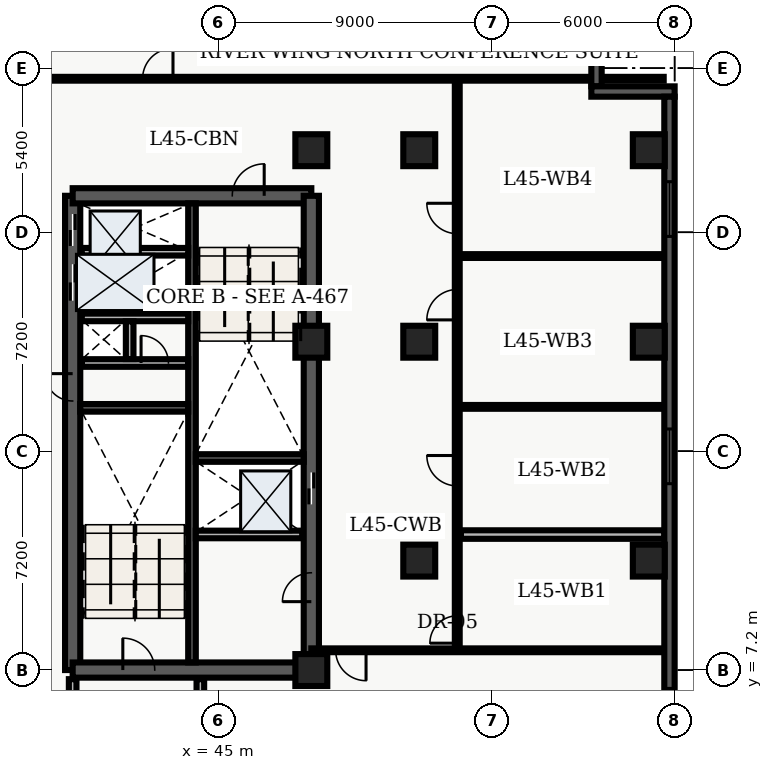
"""IFC4 building model, lengths in metres.
Left out: names, types, materials, properties, quantities, classifications, styles, units other than length and angle.
Written with IfcOpenShell. Run it as: python <this file> out.ifc"""

import sys

from ifc_helpers import new_model, entity, si_unit, converted_unit, direction, frame, origin_with_axes, origin_2d_with_axis, place, context, subcontext, project, spatial, polyline, rectangle, outline, extrude, element, fill, save


model = new_model("IFC4")
c1 = context("Model", 3, precision=1e-05, world=origin_with_axes(), true_north=direction((0.0, 1.0)))
c2 = subcontext(c1, "Body", "Model", "MODEL_VIEW")
j1 = project(units=[si_unit("LENGTHUNIT", "METRE"), converted_unit("PLANEANGLEUNIT", "DEGREE", entity("IfcPlaneAngleMeasure", 0.017), si_unit("PLANEANGLEUNIT", "RADIAN"), dimensions=[0, 0, 0, 0, 0, 0, 0])], contexts=[c1])
p1 = place(None, origin_with_axes())
s1 = spatial("IfcSite", under=j1, at=p1, CompositionType="ELEMENT")
p2 = place(p1, origin_with_axes())
s2 = spatial("IfcBuilding", under=s1, at=p2, CompositionType="ELEMENT")
p3 = place(p2, frame((0.0, 0.0, 183.6), z_axis=(0.0, 0.0, 1.0), x_axis=(1.0, 0.0, 0.0)))
s3 = spatial("IfcBuildingStorey", under=s2, at=p3, CompositionType="ELEMENT", Elevation=183.6)
p4 = place(p3, frame((40.2, 7.2, 0.0), z_axis=(0.0, 0.0, 1.0), x_axis=(0.0, 1.0, 0.0)))
e1 = element("IfcWall", 1, at=p4, inside=s3, PredefinedType="SHEAR", context=c2, shape_type="SweptSolid", body=[
    extrude(outline(polyline([(0.0, -0.25), (15.6, -0.25), (15.6, 0.25), (0.0, 0.25), (0.0, -0.25)])), origin_with_axes(), (0.0, 0.0, 1.0), 3.6),
])
p5 = place(p4, frame((14.475, 0.0, 0.0), z_axis=(0.0, 0.0, 1.0), x_axis=(1.0, 0.0, 0.0)))
e2 = element("IfcOpeningElement", 2, at=p5, cuts=e1, PredefinedType="OPENING", context=c2, shape_type="SweptSolid", body=[
    extrude(rectangle(XDim=1.05, YDim=0.52, at=origin_2d_with_axis()), origin_with_axes(), (0.0, 0.0, 1.0), 2.15),
])
p6 = place(p4, frame((12.75, 0.0, 0.0), z_axis=(0.0, 0.0, 1.0), x_axis=(1.0, 0.0, 0.0)))
e3 = element("IfcOpeningElement", 3, at=p6, cuts=e1, PredefinedType="OPENING", context=c2, shape_type="SweptSolid", body=[
    extrude(rectangle(XDim=1.2, YDim=0.52, at=origin_2d_with_axis()), origin_with_axes(), (0.0, 0.0, 1.0), 2.15),
])
p7 = place(p4, frame((9.3, 0.0, 0.0), z_axis=(0.0, 0.0, 1.0), x_axis=(1.0, 0.0, 0.0)))
e4 = element("IfcOpeningElement", 4, at=p7, cuts=e1, PredefinedType="OPENING", context=c2, shape_type="SweptSolid", body=[
    extrude(rectangle(XDim=0.9, YDim=0.52, at=origin_2d_with_axis()), origin_with_axes(), (0.0, 0.0, 1.0), 2.15),
])
p8 = place(p3, frame((40.2, 7.2, 0.0), z_axis=(0.0, 0.0, 1.0), x_axis=(1.0, 0.0, 0.0)))
e5 = element("IfcWall", 5, at=p8, inside=s3, PredefinedType="SHEAR", context=c2, shape_type="SweptSolid", body=[
    extrude(outline(polyline([(0.0, -0.25), (7.85, -0.25), (7.85, 0.25), (0.0, 0.25), (0.0, -0.25)])), origin_with_axes(), (0.0, 0.0, 1.0), 3.6),
])
p9 = place(p8, frame((2.175, 0.0, 0.0), z_axis=(0.0, 0.0, 1.0), x_axis=(1.0, 0.0, 0.0)))
e6 = element("IfcOpeningElement", 6, at=p9, cuts=e5, PredefinedType="OPENING", context=c2, shape_type="SweptSolid", body=[
    extrude(rectangle(XDim=1.05, YDim=0.52, at=origin_2d_with_axis()), origin_with_axes(), (0.0, 0.0, 1.0), 2.15),
])
p10 = place(p3, frame((40.2, 22.8, 0.0), z_axis=(0.0, 0.0, 1.0), x_axis=(1.0, 0.0, 0.0)))
e7 = element("IfcWall", 7, at=p10, inside=s3, PredefinedType="SHEAR", context=c2, shape_type="SweptSolid", body=[
    extrude(outline(polyline([(0.0, -0.25), (7.85, -0.25), (7.85, 0.25), (0.0, 0.25), (0.0, -0.25)])), origin_with_axes(), (0.0, 0.0, 1.0), 3.6),
])
p11 = place(p10, frame((5.775, 0.0, 0.0), z_axis=(0.0, 0.0, 1.0), x_axis=(1.0, 0.0, 0.0)))
e8 = element("IfcOpeningElement", 8, at=p11, cuts=e7, PredefinedType="OPENING", context=c2, shape_type="SweptSolid", body=[
    extrude(rectangle(XDim=1.05, YDim=0.52, at=origin_2d_with_axis()), origin_with_axes(), (0.0, 0.0, 1.0), 2.15),
])
p12 = place(p3, frame((48.05, 7.2, 0.0), z_axis=(0.0, 0.0, 1.0), x_axis=(0.0, 1.0, 0.0)))
e9 = element("IfcWall", 9, at=p12, inside=s3, PredefinedType="SHEAR", context=c2, shape_type="SweptSolid", body=[
    extrude(outline(polyline([(0.0, -0.25), (15.6, -0.25), (15.6, 0.25), (0.0, 0.25), (0.0, -0.25)])), origin_with_axes(), (0.0, 0.0, 1.0), 3.6),
])
p13 = place(p12, frame((5.975, 0.0, 0.0), z_axis=(0.0, 0.0, 1.0), x_axis=(1.0, 0.0, 0.0)))
e10 = element("IfcOpeningElement", 10, at=p13, cuts=e9, PredefinedType="OPENING", context=c2, shape_type="SweptSolid", body=[
    extrude(rectangle(XDim=1.05, YDim=0.52, at=origin_2d_with_axis()), origin_with_axes(), (0.0, 0.0, 1.0), 2.15),
])
p14 = place(p12, frame((2.725, 0.0, 0.0), z_axis=(0.0, 0.0, 1.0), x_axis=(1.0, 0.0, 0.0)))
e11 = element("IfcOpeningElement", 11, at=p14, cuts=e9, PredefinedType="OPENING", context=c2, shape_type="SweptSolid", body=[
    extrude(rectangle(XDim=0.95, YDim=0.52, at=origin_2d_with_axis()), origin_with_axes(), (0.0, 0.0, 1.0), 2.15),
])
p15 = place(p3, frame((44.125, 7.45, 0.0), z_axis=(0.0, 0.0, 1.0), x_axis=(0.0, 1.0, 0.0)))
e12 = element("IfcWall", 12, at=p15, inside=s3, PredefinedType="SHEAR", context=c2, shape_type="SweptSolid", body=[
    extrude(outline(polyline([(0.0, -0.125), (15.1, -0.125), (15.1, 0.125), (0.0, 0.125), (0.0, -0.125)])), origin_with_axes(), (0.0, 0.0, 1.0), 3.6),
])
for number, where, z_axis, x_axis in (
    (13, (40.45, 15.825, 0.0), (0.0, 0.0, 1.0), (1.0, 0.0, 0.0)),
    (14, (44.25, 14.175, 0.0), (0.0, 0.0, 1.0), (1.0, 0.0, 0.0)),
):
    element("IfcWall", number, at=place(p3, frame(where, z_axis=z_axis, x_axis=x_axis)), inside=s3, PredefinedType="SHEAR", context=c2, shape_type="SweptSolid", body=[
        extrude(outline(polyline([(0.0, -0.125), (3.55, -0.125), (3.55, 0.125), (0.0, 0.125), (0.0, -0.125)])), origin_with_axes(), (0.0, 0.0, 1.0), 3.6),
    ])
p16 = place(p3, frame((40.5, 17.3, 0.0), z_axis=(0.0, 0.0, 1.0), x_axis=(1.0, 0.0, 0.0)))
e15 = element("IfcWall", 15, at=p16, inside=s3, PredefinedType="SOLIDWALL", context=c2, shape_type="SweptSolid", body=[
    extrude(outline(polyline([(0.0, -0.125), (3.5, -0.125), (3.5, 0.125), (0.0, 0.125), (0.0, -0.125)])), origin_with_axes(), (0.0, 0.0, 1.0), 2.64),
])
p17 = place(p16, frame((2.4, 0.0, 0.0), z_axis=(0.0, 0.0, 1.0), x_axis=(1.0, 0.0, 0.0)))
e16 = element("IfcOpeningElement", 16, at=p17, cuts=e15, PredefinedType="OPENING", context=c2, shape_type="SweptSolid", body=[
    extrude(rectangle(XDim=0.9, YDim=0.27, at=origin_2d_with_axis()), origin_with_axes(), (0.0, 0.0, 1.0), 2.15),
])
p18 = place(p3, frame((40.5, 18.8, 0.0), z_axis=(0.0, 0.0, 1.0), x_axis=(1.0, 0.0, 0.0)))
e17 = element("IfcWall", 17, at=p18, inside=s3, PredefinedType="SOLIDWALL", context=c2, shape_type="SweptSolid", body=[
    extrude(outline(polyline([(0.0, -0.125), (3.5, -0.125), (3.5, 0.125), (0.0, 0.125), (0.0, -0.125)])), origin_with_axes(), (0.0, 0.0, 1.0), 2.64),
])
p19 = place(p3, frame((42.075, 17.43, 0.0), z_axis=(0.0, 0.0, 1.0), x_axis=(0.0, 1.0, 0.0)))
e18 = element("IfcWall", 18, at=p19, inside=s3, PredefinedType="SOLIDWALL", context=c2, shape_type="SweptSolid", body=[
    extrude(outline(polyline([(0.0, -0.125), (1.24, -0.125), (1.24, 0.125), (0.0, 0.125), (0.0, -0.125)])), origin_with_axes(), (0.0, 0.0, 1.0), 2.64),
])
p20 = place(p3, frame((40.2, 3.1, 0.0), z_axis=(0.0, 0.0, 1.0), x_axis=(0.0, 1.0, 0.0)))
e19 = element("IfcWall", 19, at=p20, inside=s3, PredefinedType="SOLIDWALL", context=c2, shape_type="SweptSolid", body=[
    extrude(outline(polyline([(0.0, -0.125), (3.8, -0.125), (3.8, 0.125), (0.0, 0.125), (0.0, -0.125)])), origin_with_axes(), (0.0, 0.0, 1.0), 2.64),
])
p21 = place(p20, frame((2.075, 0.0, 0.0), z_axis=(0.0, 0.0, 1.0), x_axis=(1.0, 0.0, 0.0)))
e20 = element("IfcOpeningElement", 20, at=p21, cuts=e19, PredefinedType="OPENING", context=c2, shape_type="SweptSolid", body=[
    extrude(rectangle(XDim=1.05, YDim=0.27, at=origin_2d_with_axis()), origin_with_axes(), (0.0, 0.0, 1.0), 2.15),
])
p22 = place(p3, frame((44.4, 3.1, 0.0), z_axis=(0.0, 0.0, 1.0), x_axis=(0.0, 1.0, 0.0)))
e21 = element("IfcWall", 21, at=p22, inside=s3, PredefinedType="SOLIDWALL", context=c2, shape_type="SweptSolid", body=[
    extrude(outline(polyline([(0.0, -0.125), (3.8, -0.125), (3.8, 0.125), (0.0, 0.125), (0.0, -0.125)])), origin_with_axes(), (0.0, 0.0, 1.0), 2.64),
])
for number, where, z_axis, x_axis in (
    (22, (48.05, 7.2, 0.0), (0.0, 0.0, 1.0), (1.0, 0.0, 0.0)),
    (23, (48.05, 18.0, 0.0), (0.0, 0.0, 1.0), (1.0, 0.0, 0.0)),
    (24, (48.05, 24.3, 0.0), (0.0, 0.0, 1.0), (1.0, 0.0, 0.0)),
    (25, (51.6, 10.8, 0.0), (0.0, 0.0, 1.0), (1.0, 0.0, 0.0)),
    (26, (51.6, 18.0, 0.0), (0.0, 0.0, 1.0), (1.0, 0.0, 0.0)),
    (27, (51.6, 24.3, 0.0), (0.0, 0.0, 1.0), (1.0, 0.0, 0.0)),
    (28, (59.15, 10.8, 0.0), (0.0, 0.0, 1.0), (1.0, 0.0, 0.0)),
    (29, (59.15, 18.0, 0.0), (0.0, 0.0, 1.0), (1.0, 0.0, 0.0)),
    (30, (59.15, 24.3, 0.0), (0.0, 0.0, 1.0), (1.0, 0.0, 0.0)),
):
    element("IfcColumn", number, at=place(p3, frame(where, z_axis=z_axis, x_axis=x_axis)), inside=s3, PredefinedType="COLUMN", context=c2, shape_type="SweptSolid", body=[
        extrude(rectangle(XDim=1.05, YDim=1.05, at=origin_2d_with_axis()), origin_with_axes(), (0.0, 0.0, 1.0), 3.9),
    ])
for number, where, z_axis, x_axis in (
    (31, (40.5, 20.96, 0.0), (0.0, 0.0, 1.0), (1.0, 0.0, 0.0)),
    (32, (44.25, 11.66, 0.0), (0.0, 0.0, 1.0), (1.0, 0.0, 0.0)),
):
    element("IfcWall", number, at=place(p3, frame(where, z_axis=z_axis, x_axis=x_axis)), inside=s3, PredefinedType="SOLIDWALL", context=c2, shape_type="SweptSolid", body=[
        extrude(outline(polyline([(0.0, -0.125), (3.5, -0.125), (3.5, 0.125), (0.0, 0.125), (0.0, -0.125)])), origin_with_axes(), (0.0, 0.0, 1.0), 2.64),
    ])
p23 = place(p3, frame((52.85, 7.85, 0.0), z_axis=(0.0, 0.0, 1.0), x_axis=(0.0, 1.0, 0.0)))
e33 = element("IfcWall", 33, at=p23, inside=s3, PredefinedType="PARTITIONING", context=c2, shape_type="SweptSolid", body=[
    extrude(outline(polyline([(0.0, -0.08), (18.8, -0.08), (18.8, 0.08), (0.0, 0.08), (0.0, -0.08)])), origin_with_axes(), (0.0, 0.0, 1.0), 2.64),
])
p24 = place(p23, frame((0.684, 0.0, 0.0), z_axis=(0.0, 0.0, 1.0), x_axis=(1.0, 0.0, 0.0)))
e34 = element("IfcOpeningElement", 34, at=p24, cuts=e33, PredefinedType="OPENING", context=c2, shape_type="SweptSolid", body=[
    extrude(rectangle(XDim=0.9, YDim=0.18, at=origin_2d_with_axis()), origin_with_axes(), (0.0, 0.0, 1.0), 2.15),
])
p25 = place(p23, frame((5.907, 0.0, 0.0), z_axis=(0.0, 0.0, 1.0), x_axis=(1.0, 0.0, 0.0)))
e35 = element("IfcOpeningElement", 35, at=p25, cuts=e33, PredefinedType="OPENING", context=c2, shape_type="SweptSolid", body=[
    extrude(rectangle(XDim=1.0, YDim=0.18, at=origin_2d_with_axis()), origin_with_axes(), (0.0, 0.0, 1.0), 2.15),
])
p26 = place(p23, frame((11.368, 0.0, 0.0), z_axis=(0.0, 0.0, 1.0), x_axis=(1.0, 0.0, 0.0)))
e36 = element("IfcOpeningElement", 36, at=p26, cuts=e33, PredefinedType="OPENING", context=c2, shape_type="SweptSolid", body=[
    extrude(rectangle(XDim=1.0, YDim=0.18, at=origin_2d_with_axis()), origin_with_axes(), (0.0, 0.0, 1.0), 2.15),
])
p27 = place(p23, frame((14.204, 0.0, 0.0), z_axis=(0.0, 0.0, 1.0), x_axis=(1.0, 0.0, 0.0)))
e37 = element("IfcOpeningElement", 37, at=p27, cuts=e33, PredefinedType="OPENING", context=c2, shape_type="SweptSolid", body=[
    extrude(rectangle(XDim=1.0, YDim=0.18, at=origin_2d_with_axis()), origin_with_axes(), (0.0, 0.0, 1.0), 2.15),
])
p28 = place(p3, frame((59.665, 7.85, 0.0), z_axis=(0.0, 0.0, 1.0), x_axis=(-1.0, 0.0, 0.0)))
e38 = element("IfcWall", 38, at=p28, inside=s3, PredefinedType="PARTITIONING", context=c2, shape_type="SweptSolid", body=[
    extrude(outline(polyline([(0.0, -0.062), (11.615, -0.062), (11.615, 0.062), (0.0, 0.062), (0.0, -0.062)])), origin_with_axes(), (0.0, 0.0, 1.0), 2.64),
])
p29 = place(p28, frame((10.315, 0.0, 0.0), z_axis=(0.0, 0.0, 1.0), x_axis=(1.0, 0.0, 0.0)))
e39 = element("IfcOpeningElement", 39, at=p29, cuts=e38, PredefinedType="OPENING", context=c2, shape_type="SweptSolid", body=[
    extrude(rectangle(XDim=1.0, YDim=0.145, at=origin_2d_with_axis()), origin_with_axes(), (0.0, 0.0, 1.0), 2.15),
])
p30 = place(p3, frame((38.735, 26.65, 0.0), z_axis=(0.0, 0.0, 1.0), x_axis=(1.0, 0.0, 0.0)))
e40 = element("IfcWall", 40, at=p30, inside=s3, PredefinedType="PARTITIONING", context=c2, shape_type="SweptSolid", body=[
    extrude(outline(polyline([(0.0, -0.062), (20.905, -0.062), (20.905, 0.062), (0.0, 0.062), (0.0, -0.062)])), origin_with_axes(), (0.0, 0.0, 1.0), 2.64),
])
p31 = place(p30, frame((4.265, 0.0, 0.0), z_axis=(0.0, 0.0, 1.0), x_axis=(1.0, 0.0, 0.0)))
e41 = element("IfcOpeningElement", 41, at=p31, cuts=e40, PredefinedType="OPENING", context=c2, shape_type="SweptSolid", body=[
    extrude(rectangle(XDim=1.0, YDim=0.145, at=origin_2d_with_axis()), origin_with_axes(), (0.0, 0.0, 1.0), 2.15),
])
p32 = place(p3, frame((52.97, 11.657, 0.0), z_axis=(0.0, 0.0, 1.0), x_axis=(1.0, 0.0, 0.0)))
e42 = element("IfcWall", 42, at=p32, inside=s3, PredefinedType="PARTITIONING", context=c2, shape_type="SweptSolid", body=[
    extrude(outline(polyline([(0.0, -0.14), (6.695, -0.14), (6.695, 0.14), (0.0, 0.14), (0.0, -0.14)])), origin_with_axes(), (0.0, 0.0, 1.0), 2.64),
])
for number, where, z_axis, x_axis in (
    (43, (52.97, 15.857, 0.0), (0.0, 0.0, 1.0), (1.0, 0.0, 0.0)),
    (44, (52.97, 20.818, 0.0), (0.0, 0.0, 1.0), (1.0, 0.0, 0.0)),
):
    element("IfcWall", number, at=place(p3, frame(where, z_axis=z_axis, x_axis=x_axis)), inside=s3, PredefinedType="PARTITIONING", context=c2, shape_type="SweptSolid", body=[
        extrude(outline(polyline([(0.0, -0.062), (6.695, -0.062), (6.695, 0.062), (0.0, 0.062), (0.0, -0.062)])), origin_with_axes(), (0.0, 0.0, 1.0), 2.64),
    ])
p33 = place(p3, frame((57.43, 28.46, 0.0), z_axis=(0.0, 0.0, 1.0), x_axis=(0.0, -1.0, 0.0)))
e45 = element("IfcWall", 45, at=p33, inside=s3, PredefinedType="SOLIDWALL", context=c2, shape_type="SweptSolid", body=[
    extrude(outline(polyline([(0.0, -0.17), (2.06, -0.17), (2.06, 0.17), (0.0, 0.17), (0.0, -0.17)])), origin_with_axes(), (0.0, 0.0, 1.0), 3.6),
])
p34 = place(p3, frame((57.26, 26.23, 0.0), z_axis=(0.0, 0.0, 1.0), x_axis=(1.0, 0.0, 0.0)))
e46 = element("IfcWall", 46, at=p34, inside=s3, PredefinedType="SOLIDWALL", context=c2, shape_type="SweptSolid", body=[
    extrude(outline(polyline([(0.0, -0.17), (2.74, -0.17), (2.74, 0.17), (0.0, 0.17), (0.0, -0.17)])), origin_with_axes(), (0.0, 0.0, 1.0), 3.6),
])
p35 = place(p3, frame((59.83, 26.06, 0.0), z_axis=(0.0, 0.0, 1.0), x_axis=(0.0, -1.0, 0.0)))
e47 = element("IfcWall", 47, at=p35, inside=s3, PredefinedType="SOLIDWALL", context=c2, shape_type="SweptSolid", body=[
    extrude(outline(polyline([(0.0, -0.17), (23.66, -0.17), (23.66, 0.17), (0.0, 0.17), (0.0, -0.17)])), origin_with_axes(), (0.0, 0.0, 1.0), 3.6),
])
p36 = place(p35, frame((3.696, 0.0, 0.45), z_axis=(0.0, 0.0, 1.0), x_axis=(1.0, 0.0, 0.0)))
e48 = element("IfcOpeningElement", 48, at=p36, cuts=e47, PredefinedType="OPENING", context=c2, shape_type="SweptSolid", body=[
    extrude(rectangle(XDim=1.8, YDim=0.36, at=origin_2d_with_axis()), origin_with_axes(), (0.0, 0.0, 1.0), 2.1),
])
p37 = place(p35, frame((11.83, 0.0, 0.45), z_axis=(0.0, 0.0, 1.0), x_axis=(1.0, 0.0, 0.0)))
e49 = element("IfcOpeningElement", 49, at=p37, cuts=e47, PredefinedType="OPENING", context=c2, shape_type="SweptSolid", body=[
    extrude(rectangle(XDim=1.8, YDim=0.36, at=origin_2d_with_axis()), origin_with_axes(), (0.0, 0.0, 1.0), 2.1),
])
p38 = place(p35, frame((20.364, 0.0, 0.45), z_axis=(0.0, 0.0, 1.0), x_axis=(1.0, 0.0, 0.0)))
e50 = element("IfcOpeningElement", 50, at=p38, cuts=e47, PredefinedType="OPENING", context=c2, shape_type="SweptSolid", body=[
    extrude(rectangle(XDim=1.8, YDim=0.36, at=origin_2d_with_axis()), origin_with_axes(), (0.0, 0.0, 1.0), 2.1),
])
p39 = place(p12, frame((5.975, 0.0, 0.0), z_axis=(0.0, 0.0, 1.0), x_axis=(1.0, 0.0, 0.0)))
e51 = element("IfcDoor", 51, at=p39, inside=s3, OperationType="SLIDING_TO_LEFT", PredefinedType="DOOR", context=c2, shape_type="SweptSolid", body=[
    extrude(rectangle(XDim=1.05, YDim=0.09, at=origin_2d_with_axis()), origin_with_axes(), (0.0, 0.0, 1.0), 2.15),
])
fill(e10, e51)
p40 = place(p4, frame((14.475, 0.0, 0.0), z_axis=(0.0, 0.0, 1.0), x_axis=(1.0, 0.0, 0.0)))
e52 = element("IfcDoor", 52, at=p40, inside=s3, OperationType="SLIDING_TO_RIGHT", PredefinedType="DOOR", context=c2, shape_type="SweptSolid", body=[
    extrude(rectangle(XDim=1.05, YDim=0.09, at=origin_2d_with_axis()), origin_with_axes(), (0.0, 0.0, 1.0), 2.15),
])
fill(e2, e52)
p41 = place(p4, frame((12.75, 0.0, 0.0), z_axis=(0.0, 0.0, 1.0), x_axis=(1.0, 0.0, 0.0)))
e53 = element("IfcDoor", 53, at=p41, inside=s3, OperationType="DOUBLE_DOOR_SLIDING", PredefinedType="DOOR", context=c2, shape_type="SweptSolid", body=[
    extrude(rectangle(XDim=1.2, YDim=0.09, at=origin_2d_with_axis()), origin_with_axes(), (0.0, 0.0, 1.0), 2.15),
])
fill(e3, e53)
p42 = place(p4, frame((9.3, 0.0, 0.0), z_axis=(0.0, 0.0, 1.0), x_axis=(1.0, 0.0, 0.0)))
e54 = element("IfcDoor", 54, at=p42, inside=s3, OperationType="SINGLE_SWING_RIGHT", PredefinedType="DOOR", context=c2, shape_type="SweptSolid", body=[
    extrude(rectangle(XDim=0.9, YDim=0.09, at=origin_2d_with_axis()), origin_with_axes(), (0.0, 0.0, 1.0), 2.15),
])
fill(e4, e54)
p43 = place(p16, frame((2.4, 0.0, 0.0), z_axis=(0.0, 0.0, 1.0), x_axis=(1.0, 0.0, 0.0)))
e55 = element("IfcDoor", 55, at=p43, inside=s3, OperationType="SINGLE_SWING_LEFT", PredefinedType="DOOR", context=c2, shape_type="SweptSolid", body=[
    extrude(rectangle(XDim=0.9, YDim=0.09, at=origin_2d_with_axis()), origin_with_axes(), (0.0, 0.0, 1.0), 2.15),
])
fill(e16, e55)
p44 = place(p8, frame((2.175, 0.0, 0.0), z_axis=(0.0, 0.0, 1.0), x_axis=(1.0, 0.0, 0.0)))
e56 = element("IfcDoor", 56, at=p44, inside=s3, OperationType="SINGLE_SWING_LEFT", PredefinedType="DOOR", context=c2, shape_type="SweptSolid", body=[
    extrude(rectangle(XDim=1.05, YDim=0.09, at=origin_2d_with_axis()), origin_with_axes(), (0.0, 0.0, 1.0), 2.15),
])
fill(e6, e56)
p45 = place(p10, frame((5.775, 0.0, 0.0), z_axis=(0.0, 0.0, 1.0), x_axis=(1.0, 0.0, 0.0)))
e57 = element("IfcDoor", 57, at=p45, inside=s3, OperationType="SINGLE_SWING_RIGHT", PredefinedType="DOOR", context=c2, shape_type="SweptSolid", body=[
    extrude(rectangle(XDim=1.05, YDim=0.09, at=origin_2d_with_axis()), origin_with_axes(), (0.0, 0.0, 1.0), 2.15),
])
fill(e8, e57)
p46 = place(p12, frame((2.725, 0.0, 0.0), z_axis=(0.0, 0.0, 1.0), x_axis=(1.0, 0.0, 0.0)))
e58 = element("IfcDoor", 58, at=p46, inside=s3, OperationType="SINGLE_SWING_LEFT", PredefinedType="DOOR", context=c2, shape_type="SweptSolid", body=[
    extrude(rectangle(XDim=0.95, YDim=0.09, at=origin_2d_with_axis()), origin_with_axes(), (0.0, 0.0, 1.0), 2.15),
])
fill(e11, e58)
p47 = place(p28, frame((10.315, 0.0, 0.0), z_axis=(0.0, 0.0, 1.0), x_axis=(1.0, 0.0, 0.0)))
e59 = element("IfcDoor", 59, at=p47, inside=s3, OperationType="SINGLE_SWING_LEFT", PredefinedType="DOOR", context=c2, shape_type="SweptSolid", body=[
    extrude(rectangle(XDim=1.0, YDim=0.075, at=origin_2d_with_axis()), origin_with_axes(), (0.0, 0.0, 1.0), 2.15),
])
fill(e39, e59)
p48 = place(p30, frame((4.265, 0.0, 0.0), z_axis=(0.0, 0.0, 1.0), x_axis=(1.0, 0.0, 0.0)))
e60 = element("IfcDoor", 60, at=p48, inside=s3, OperationType="SINGLE_SWING_RIGHT", PredefinedType="DOOR", context=c2, shape_type="SweptSolid", body=[
    extrude(rectangle(XDim=1.0, YDim=0.075, at=origin_2d_with_axis()), origin_with_axes(), (0.0, 0.0, 1.0), 2.15),
])
fill(e41, e60)
p49 = place(p23, frame((0.684, 0.0, 0.0), z_axis=(0.0, 0.0, 1.0), x_axis=(1.0, 0.0, 0.0)))
e61 = element("IfcDoor", 61, at=p49, inside=s3, OperationType="SINGLE_SWING_LEFT", PredefinedType="DOOR", context=c2, shape_type="SweptSolid", body=[
    extrude(rectangle(XDim=0.9, YDim=0.09, at=origin_2d_with_axis()), origin_with_axes(), (0.0, 0.0, 1.0), 2.15),
])
fill(e34, e61)
p50 = place(p23, frame((5.907, 0.0, 0.0), z_axis=(0.0, 0.0, 1.0), x_axis=(1.0, 0.0, 0.0)))
e62 = element("IfcDoor", 62, at=p50, inside=s3, OperationType="SINGLE_SWING_RIGHT", PredefinedType="DOOR", context=c2, shape_type="SweptSolid", body=[
    extrude(rectangle(XDim=1.0, YDim=0.09, at=origin_2d_with_axis()), origin_with_axes(), (0.0, 0.0, 1.0), 2.15),
])
fill(e35, e62)
p51 = place(p23, frame((11.368, 0.0, 0.0), z_axis=(0.0, 0.0, 1.0), x_axis=(1.0, 0.0, 0.0)))
e63 = element("IfcDoor", 63, at=p51, inside=s3, OperationType="SINGLE_SWING_LEFT", PredefinedType="DOOR", context=c2, shape_type="SweptSolid", body=[
    extrude(rectangle(XDim=1.0, YDim=0.09, at=origin_2d_with_axis()), origin_with_axes(), (0.0, 0.0, 1.0), 2.15),
])
fill(e36, e63)
p52 = place(p23, frame((14.204, 0.0, 0.0), z_axis=(0.0, 0.0, 1.0), x_axis=(1.0, 0.0, 0.0)))
e64 = element("IfcDoor", 64, at=p52, inside=s3, OperationType="SINGLE_SWING_RIGHT", PredefinedType="DOOR", context=c2, shape_type="SweptSolid", body=[
    extrude(rectangle(XDim=1.0, YDim=0.09, at=origin_2d_with_axis()), origin_with_axes(), (0.0, 0.0, 1.0), 2.15),
])
fill(e37, e64)
p53 = place(p35, frame((3.696, 0.0, 0.45), z_axis=(0.0, 0.0, 1.0), x_axis=(1.0, 0.0, 0.0)))
e65 = element("IfcWindow", 65, at=p53, inside=s3, PredefinedType="WINDOW", context=c2, shape_type="SweptSolid", body=[
    extrude(rectangle(XDim=1.8, YDim=0.09, at=origin_2d_with_axis()), origin_with_axes(), (0.0, 0.0, 1.0), 2.1),
])
fill(e48, e65)
p54 = place(p35, frame((11.83, 0.0, 0.45), z_axis=(0.0, 0.0, 1.0), x_axis=(1.0, 0.0, 0.0)))
e66 = element("IfcWindow", 66, at=p54, inside=s3, PredefinedType="WINDOW", context=c2, shape_type="SweptSolid", body=[
    extrude(rectangle(XDim=1.8, YDim=0.09, at=origin_2d_with_axis()), origin_with_axes(), (0.0, 0.0, 1.0), 2.1),
])
fill(e49, e66)
p55 = place(p35, frame((20.364, 0.0, 0.45), z_axis=(0.0, 0.0, 1.0), x_axis=(1.0, 0.0, 0.0)))
e67 = element("IfcWindow", 67, at=p55, inside=s3, PredefinedType="WINDOW", context=c2, shape_type="SweptSolid", body=[
    extrude(rectangle(XDim=1.8, YDim=0.09, at=origin_2d_with_axis()), origin_with_axes(), (0.0, 0.0, 1.0), 2.1),
])
fill(e50, e67)
save(model, sys.argv[1])
